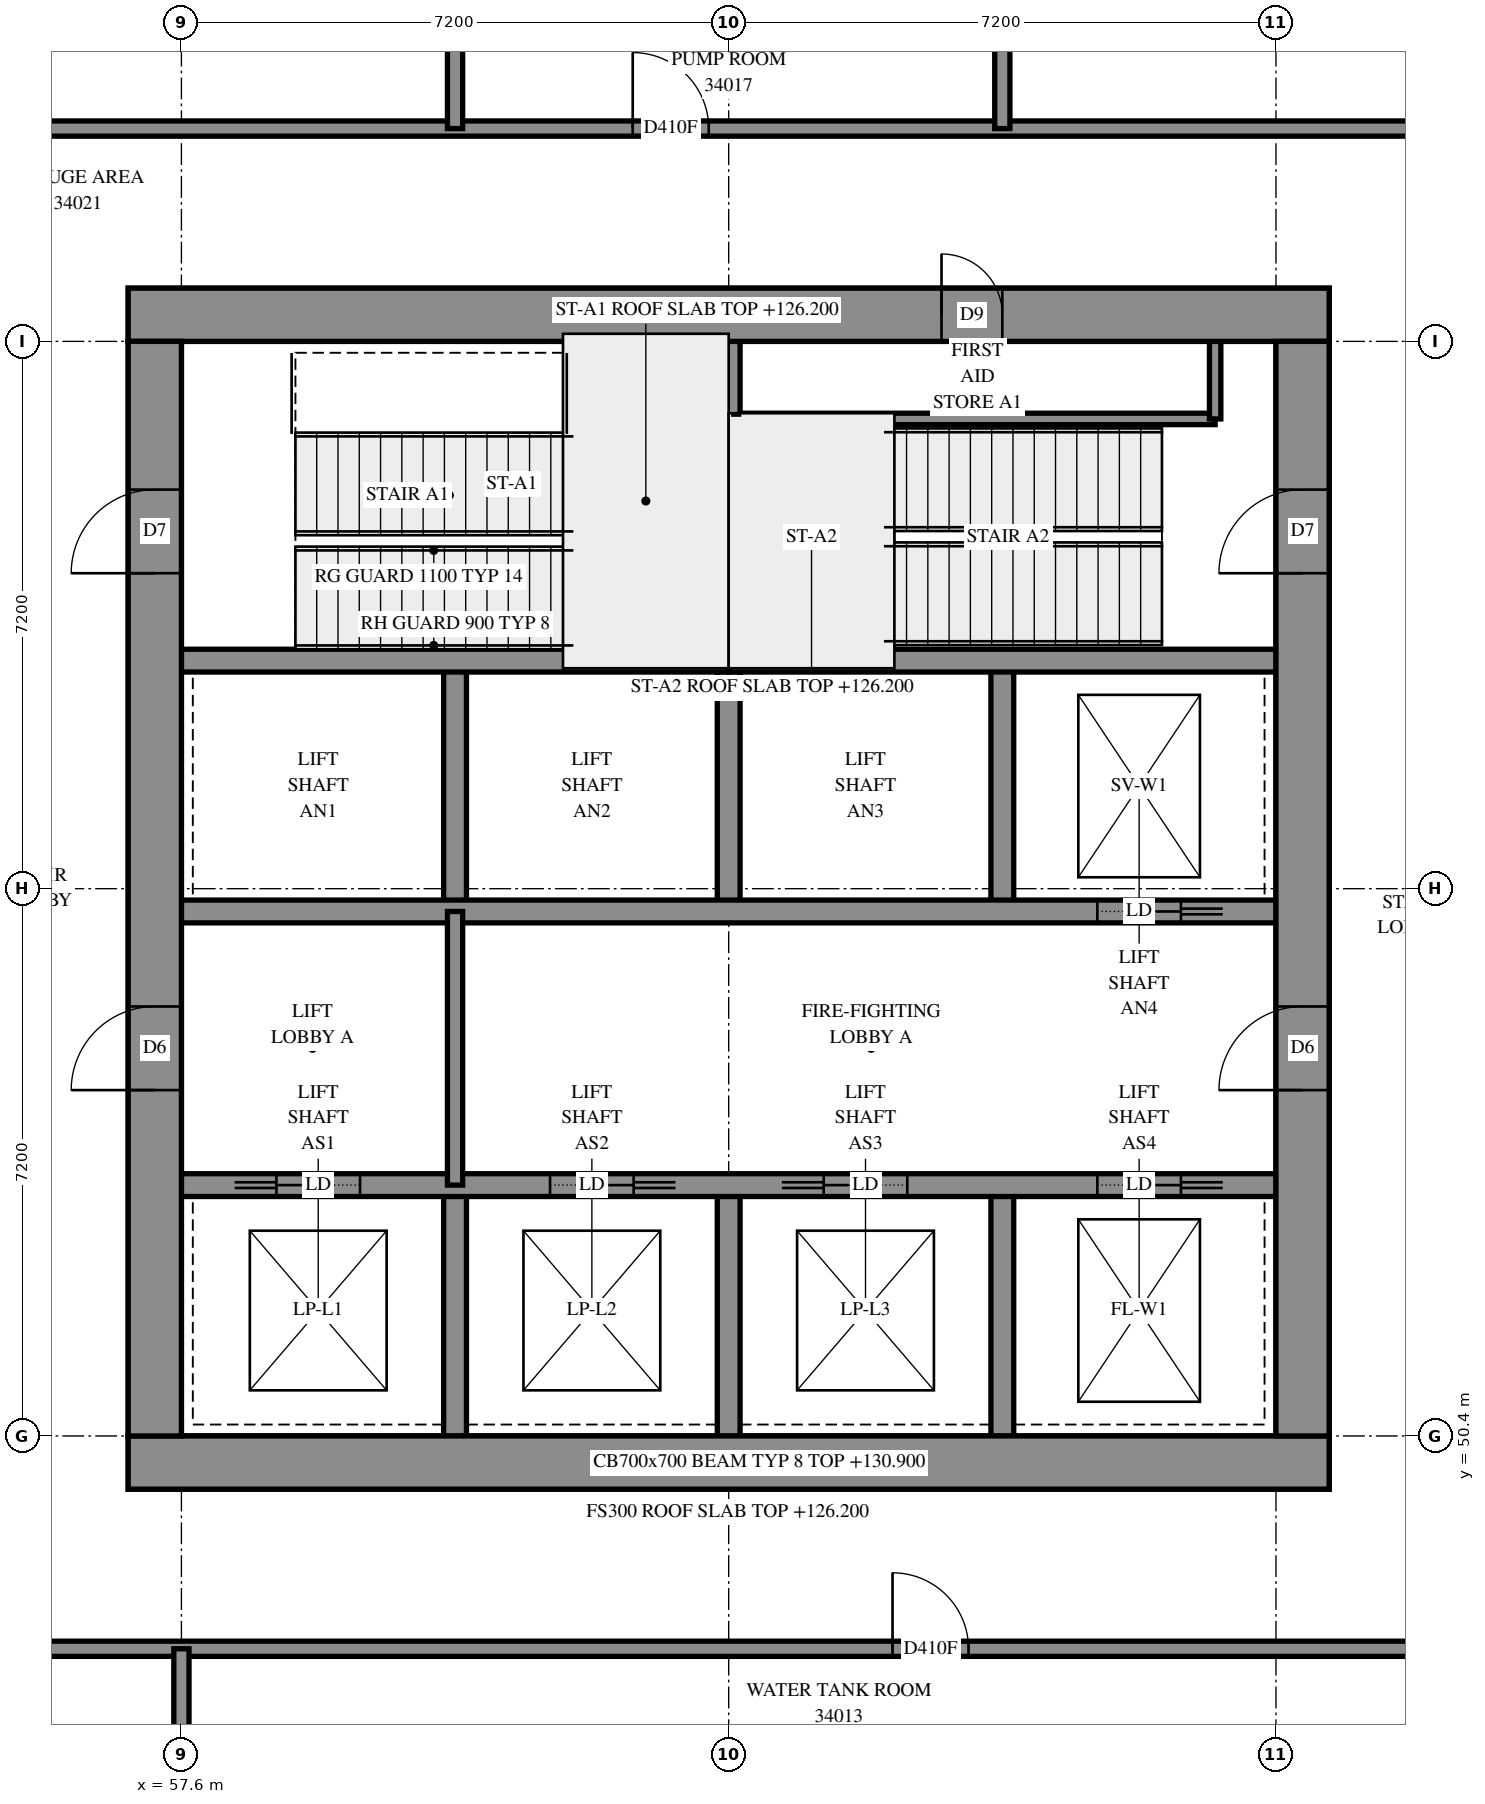
"""IFC4 building model, lengths in metres.
Left out: names, types, materials, properties, quantities, classifications, styles, units other than length and angle.
Written with IfcOpenShell. Run it as: python <this file> out.ifc"""

import sys

from ifc_helpers import new_model, si_unit, direction, frame, frame_2d, origin, place, context, subcontext, project, spatial, rectangle, extrude, element, fill, save


model = new_model("IFC4")
c1 = context("Model", 3, precision=1e-05, world=origin(), true_north=direction((0.0, 1.0)))
c2 = subcontext(c1, "Body", "Model", "MODEL_VIEW")
j1 = project(units=[si_unit("LENGTHUNIT", "METRE"), si_unit("PLANEANGLEUNIT", "RADIAN")], contexts=[c1])
p1 = place(None, origin())
s1 = spatial("IfcSite", under=j1, at=p1, CompositionType="ELEMENT")
p2 = place(p1, origin())
s2 = spatial("IfcBuilding", under=s1, at=p2, CompositionType="ELEMENT")
p3 = place(p2, frame((0.0, 0.0, 126.2)))
s3 = spatial("IfcBuildingStorey", under=s2, at=p3, CompositionType="ELEMENT", Elevation=126.2)
p4 = place(p3, frame((56.9, 50.05, -0.3), z_axis=(0.0, 0.0, 1.0), x_axis=(1.0, 0.0, 0.0)))
e1 = element("IfcWall", 1, at=p4, inside=s3, PredefinedType="SHEAR", context=c2, shape_type="SweptSolid", body=[
    extrude(rectangle(XDim=15.8, YDim=0.7, at=frame_2d((7.9, 0.0))), origin(), (0.0, 0.0, 1.0), 4.3),
])
p5 = place(p3, frame((56.9, 65.15, -0.3), z_axis=(0.0, 0.0, 1.0), x_axis=(1.0, 0.0, 0.0)))
e2 = element("IfcWall", 2, at=p5, inside=s3, PredefinedType="SHEAR", context=c2, shape_type="SweptSolid", body=[
    extrude(rectangle(XDim=15.8, YDim=0.7, at=frame_2d((7.9, 0.0))), origin(), (0.0, 0.0, 1.0), 4.3),
])
p6 = place(p5, frame((10.7, 0.0, 0.3)))
e3 = element("IfcOpeningElement", 3, at=p6, cuts=e2, PredefinedType="OPENING", context=c2, shape_type="SweptSolid", body=[
    extrude(rectangle(XDim=0.8, YDim=2.1, at=frame_2d((0.4, 1.05))), frame((0.0, 0.36, 0.0), z_axis=(0.0, -1.0, 0.0), x_axis=(1.0, 0.0, 0.0)), (0.0, 0.0, 1.0), 0.72),
])
p7 = place(p3, frame((57.25, 50.4, -0.3), z_axis=(0.0, 0.0, 1.0), x_axis=(0.0, 1.0, 0.0)))
e4 = element("IfcWall", 4, at=p7, inside=s3, PredefinedType="SHEAR", context=c2, shape_type="SweptSolid", body=[
    extrude(rectangle(XDim=14.4, YDim=0.7, at=frame_2d((7.2, 0.0))), origin(), (0.0, 0.0, 1.0), 4.3),
])
p8 = place(p7, frame((4.55, 0.0, 0.3)))
e5 = element("IfcOpeningElement", 5, at=p8, cuts=e4, PredefinedType="OPENING", context=c2, shape_type="SweptSolid", body=[
    extrude(rectangle(XDim=1.1, YDim=2.1, at=frame_2d((0.55, 1.05))), frame((0.0, 0.36, 0.0), z_axis=(0.0, -1.0, 0.0), x_axis=(1.0, 0.0, 0.0)), (0.0, 0.0, 1.0), 0.72),
])
p9 = place(p7, frame((11.35, 0.0, 0.3)))
e6 = element("IfcOpeningElement", 6, at=p9, cuts=e4, PredefinedType="OPENING", context=c2, shape_type="SweptSolid", body=[
    extrude(rectangle(XDim=1.1, YDim=2.1, at=frame_2d((0.55, 1.05))), frame((0.0, 0.36, 0.0), z_axis=(0.0, -1.0, 0.0), x_axis=(1.0, 0.0, 0.0)), (0.0, 0.0, 1.0), 0.72),
])
p10 = place(p3, frame((72.35, 50.4, -0.3), z_axis=(0.0, 0.0, 1.0), x_axis=(0.0, 1.0, 0.0)))
e7 = element("IfcWall", 7, at=p10, inside=s3, PredefinedType="SHEAR", context=c2, shape_type="SweptSolid", body=[
    extrude(rectangle(XDim=14.4, YDim=0.7, at=frame_2d((7.2, 0.0))), origin(), (0.0, 0.0, 1.0), 4.3),
])
p11 = place(p10, frame((4.55, 0.0, 0.3)))
e8 = element("IfcOpeningElement", 8, at=p11, cuts=e7, PredefinedType="OPENING", context=c2, shape_type="SweptSolid", body=[
    extrude(rectangle(XDim=1.1, YDim=2.1, at=frame_2d((0.55, 1.05))), frame((0.0, 0.36, 0.0), z_axis=(0.0, -1.0, 0.0), x_axis=(1.0, 0.0, 0.0)), (0.0, 0.0, 1.0), 0.72),
])
p12 = place(p10, frame((11.35, 0.0, 0.3)))
e9 = element("IfcOpeningElement", 9, at=p12, cuts=e7, PredefinedType="OPENING", context=c2, shape_type="SweptSolid", body=[
    extrude(rectangle(XDim=1.1, YDim=2.1, at=frame_2d((0.55, 1.05))), frame((0.0, 0.36, 0.0), z_axis=(0.0, -1.0, 0.0), x_axis=(1.0, 0.0, 0.0)), (0.0, 0.0, 1.0), 0.72),
])
for number, where, z_axis, x_axis in (
    (10, (61.2, 50.4, 0.0), (0.0, 0.0, 1.0), (0.0, 1.0, 0.0)),
    (11, (61.2, 57.3, 0.0), (0.0, 0.0, 1.0), (0.0, 1.0, 0.0)),
    (12, (64.8, 50.4, 0.0), (0.0, 0.0, 1.0), (0.0, 1.0, 0.0)),
    (13, (64.8, 57.3, 0.0), (0.0, 0.0, 1.0), (0.0, 1.0, 0.0)),
    (14, (68.4, 50.4, 0.0), (0.0, 0.0, 1.0), (0.0, 1.0, 0.0)),
    (15, (68.4, 57.3, 0.0), (0.0, 0.0, 1.0), (0.0, 1.0, 0.0)),
):
    element("IfcWall", number, at=place(p3, frame(where, z_axis=z_axis, x_axis=x_axis)), inside=s3, PredefinedType="SOLIDWALL", context=c2, shape_type="SweptSolid", body=[
        extrude(rectangle(XDim=3.3, YDim=0.3, at=frame_2d((1.65, 0.0))), origin(), (0.0, 0.0, 1.0), 4.7),
    ])
p13 = place(p3, frame((57.6, 53.7, 0.0), z_axis=(0.0, 0.0, 1.0), x_axis=(1.0, 0.0, 0.0)))
e16 = element("IfcWall", 16, at=p13, inside=s3, PredefinedType="SOLIDWALL", context=c2, shape_type="SweptSolid", body=[
    extrude(rectangle(XDim=14.4, YDim=0.3, at=frame_2d((7.2, 0.0))), origin(), (0.0, 0.0, 1.0), 4.7),
])
p14 = place(p13, frame((1.25, 0.0, 0.0)))
e17 = element("IfcOpeningElement", 17, at=p14, cuts=e16, PredefinedType="OPENING", context=c2, shape_type="SweptSolid", body=[
    extrude(rectangle(XDim=1.1, YDim=2.1, at=frame_2d((0.55, 1.05))), frame((0.0, 0.16, 0.0), z_axis=(0.0, -1.0, 0.0), x_axis=(1.0, 0.0, 0.0)), (0.0, 0.0, 1.0), 0.32),
])
p15 = place(p13, frame((4.85, 0.0, 0.0)))
e18 = element("IfcOpeningElement", 18, at=p15, cuts=e16, PredefinedType="OPENING", context=c2, shape_type="SweptSolid", body=[
    extrude(rectangle(XDim=1.1, YDim=2.1, at=frame_2d((0.55, 1.05))), frame((0.0, 0.16, 0.0), z_axis=(0.0, -1.0, 0.0), x_axis=(1.0, 0.0, 0.0)), (0.0, 0.0, 1.0), 0.32),
])
p16 = place(p13, frame((8.45, 0.0, 0.0)))
e19 = element("IfcOpeningElement", 19, at=p16, cuts=e16, PredefinedType="OPENING", context=c2, shape_type="SweptSolid", body=[
    extrude(rectangle(XDim=1.1, YDim=2.1, at=frame_2d((0.55, 1.05))), frame((0.0, 0.16, 0.0), z_axis=(0.0, -1.0, 0.0), x_axis=(1.0, 0.0, 0.0)), (0.0, 0.0, 1.0), 0.32),
])
p17 = place(p13, frame((12.05, 0.0, 0.0)))
e20 = element("IfcOpeningElement", 20, at=p17, cuts=e16, PredefinedType="OPENING", context=c2, shape_type="SweptSolid", body=[
    extrude(rectangle(XDim=1.1, YDim=2.1, at=frame_2d((0.55, 1.05))), frame((0.0, 0.16, 0.0), z_axis=(0.0, -1.0, 0.0), x_axis=(1.0, 0.0, 0.0)), (0.0, 0.0, 1.0), 0.32),
])
p18 = place(p3, frame((57.6, 57.3, 0.0), z_axis=(0.0, 0.0, 1.0), x_axis=(1.0, 0.0, 0.0)))
e21 = element("IfcWall", 21, at=p18, inside=s3, PredefinedType="SOLIDWALL", context=c2, shape_type="SweptSolid", body=[
    extrude(rectangle(XDim=14.4, YDim=0.3, at=frame_2d((7.2, 0.0))), origin(), (0.0, 0.0, 1.0), 4.7),
])
p19 = place(p18, frame((12.05, 0.0, 0.0)))
e22 = element("IfcOpeningElement", 22, at=p19, cuts=e21, PredefinedType="OPENING", context=c2, shape_type="SweptSolid", body=[
    extrude(rectangle(XDim=1.1, YDim=2.1, at=frame_2d((0.55, 1.05))), frame((0.0, 0.16, 0.0), z_axis=(0.0, -1.0, 0.0), x_axis=(1.0, 0.0, 0.0)), (0.0, 0.0, 1.0), 0.32),
])
for number, where, z_axis, x_axis in (
    (23, (57.6, 60.6, 0.0), (0.0, 0.0, 1.0), (1.0, 0.0, 0.0)),
    (24, (64.8, 60.6, 0.0), (0.0, 0.0, 1.0), (1.0, 0.0, 0.0)),
):
    element("IfcWall", number, at=place(p3, frame(where, z_axis=z_axis, x_axis=x_axis)), inside=s3, PredefinedType="SOLIDWALL", context=c2, shape_type="SweptSolid", body=[
        extrude(rectangle(XDim=7.2, YDim=0.3, at=frame_2d((3.6, 0.0))), origin(), (0.0, 0.0, 1.0), 4.7),
    ])
p20 = place(p3, frame((64.8, 60.6, 0.0), z_axis=(0.0, 0.0, 1.0), x_axis=(0.0, 1.0, 0.0)))
e25 = element("IfcWall", 25, at=p20, inside=s3, PredefinedType="SOLIDWALL", context=c2, shape_type="SweptSolid", body=[
    extrude(rectangle(XDim=4.2, YDim=0.3, at=frame_2d((2.1, 0.0))), origin(), (0.0, 0.0, 1.0), 4.7),
])
p21 = place(p3, frame((64.95, 63.78, 0.0), z_axis=(0.0, 0.0, 1.0), x_axis=(1.0, 0.0, 0.0)))
e26 = element("IfcWall", 26, at=p21, inside=s3, PredefinedType="PARTITIONING", context=c2, shape_type="SweptSolid", body=[
    extrude(rectangle(XDim=6.25, YDim=0.15, at=frame_2d((3.125, 0.0))), origin(), (0.0, 0.0, 1.0), 4.7),
])
p22 = place(p3, frame((71.2, 63.78, 0.0), z_axis=(0.0, 0.0, 1.0), x_axis=(0.0, 1.0, 0.0)))
e27 = element("IfcWall", 27, at=p22, inside=s3, PredefinedType="PARTITIONING", context=c2, shape_type="SweptSolid", body=[
    extrude(rectangle(XDim=1.02, YDim=0.15, at=frame_2d((0.51, 0.0))), origin(), (0.0, 0.0, 1.0), 4.7),
])
p23 = place(p3, frame((61.2, 53.7, 0.0), z_axis=(0.0, 0.0, 1.0), x_axis=(0.0, 1.0, 0.0)))
e28 = element("IfcWall", 28, at=p23, inside=s3, PredefinedType="PARTITIONING", context=c2, shape_type="SweptSolid", body=[
    extrude(rectangle(XDim=3.6, YDim=0.2, at=frame_2d((1.8, 0.0))), origin(), (0.0, 0.0, 1.0), 4.7),
])
p24 = place(p3, frame((54.8, 67.6, 0.0), z_axis=(0.0, 0.0, 1.0), x_axis=(1.0, 0.0, 0.0)))
e29 = element("IfcWall", 29, at=p24, inside=s3, PredefinedType="PARTITIONING", context=c2, shape_type="SweptSolid", body=[
    extrude(rectangle(XDim=19.998, YDim=0.2, at=frame_2d((9.999, 0.0))), origin(), (0.0, 0.0, 1.0), 4.7),
])
p25 = place(p24, frame((8.738, 0.0, 0.0)))
e30 = element("IfcOpeningElement", 30, at=p25, cuts=e29, PredefinedType="OPENING", context=c2, shape_type="SweptSolid", body=[
    extrude(rectangle(XDim=1.0, YDim=2.1, at=frame_2d((0.5, 1.05))), frame((0.0, 0.11, 0.0), z_axis=(0.0, -1.0, 0.0), x_axis=(1.0, 0.0, 0.0)), (0.0, 0.0, 1.0), 0.22),
])
p26 = place(p3, frame((54.8, 47.6, 0.0), z_axis=(0.0, 0.0, 1.0), x_axis=(1.0, 0.0, 0.0)))
e31 = element("IfcWall", 31, at=p26, inside=s3, PredefinedType="PARTITIONING", context=c2, shape_type="SweptSolid", body=[
    extrude(rectangle(XDim=19.384, YDim=0.2, at=frame_2d((9.692, 0.0))), origin(), (0.0, 0.0, 1.0), 4.7),
])
p27 = place(p26, frame((12.156, 0.0, 0.0)))
e32 = element("IfcOpeningElement", 32, at=p27, cuts=e31, PredefinedType="OPENING", context=c2, shape_type="SweptSolid", body=[
    extrude(rectangle(XDim=1.0, YDim=2.1, at=frame_2d((0.5, 1.05))), frame((0.0, 0.11, 0.0), z_axis=(0.0, -1.0, 0.0), x_axis=(1.0, 0.0, 0.0)), (0.0, 0.0, 1.0), 0.22),
])
for number, where, z_axis, x_axis in (
    (33, (57.6, 46.15, 0.0), (0.0, 0.0, 1.0), (0.0, 1.0, 0.0)),
    (34, (61.2, 67.6, 0.0), (0.0, 0.0, 1.0), (0.0, 1.0, 0.0)),
    (35, (68.4, 67.6, 0.0), (0.0, 0.0, 1.0), (0.0, 1.0, 0.0)),
):
    element("IfcWall", number, at=place(p3, frame(where, z_axis=z_axis, x_axis=x_axis)), inside=s3, PredefinedType="PARTITIONING", context=c2, shape_type="SweptSolid", body=[
        extrude(rectangle(XDim=1.45, YDim=0.2, at=frame_2d((0.725, 0.0))), origin(), (0.0, 0.0, 1.0), 4.7),
    ])
p28 = place(p6, origin())
e36 = element("IfcDoor", 36, at=p28, inside=s3, OperationType="SINGLE_SWING_RIGHT", PredefinedType="DOOR", context=c2, shape_type="SweptSolid", body=[
    extrude(rectangle(XDim=0.8, YDim=2.1, at=frame_2d((0.4, 1.05))), frame((0.0, -0.29, 0.0), z_axis=(0.0, -1.0, 0.0), x_axis=(1.0, 0.0, 0.0)), (0.0, 0.0, 1.0), 0.05),
])
fill(e3, e36)
p29 = place(p8, origin())
e37 = element("IfcDoor", 37, at=p29, inside=s3, OperationType="DOUBLE_DOOR_SINGLE_SWING", PredefinedType="DOOR", context=c2, shape_type="SweptSolid", body=[
    extrude(rectangle(XDim=1.1, YDim=2.1, at=frame_2d((0.55, 1.05))), frame((0.0, 0.025, 0.0), z_axis=(0.0, -1.0, 0.0), x_axis=(1.0, 0.0, 0.0)), (0.0, 0.0, 1.0), 0.05),
])
fill(e5, e37)
p30 = place(p11, origin())
e38 = element("IfcDoor", 38, at=p30, inside=s3, OperationType="DOUBLE_DOOR_SINGLE_SWING", PredefinedType="DOOR", context=c2, shape_type="SweptSolid", body=[
    extrude(rectangle(XDim=1.1, YDim=2.1, at=frame_2d((0.55, 1.05))), frame((0.0, 0.025, 0.0), z_axis=(0.0, -1.0, 0.0), x_axis=(1.0, 0.0, 0.0)), (0.0, 0.0, 1.0), 0.05),
])
fill(e8, e38)
p31 = place(p9, origin())
e39 = element("IfcDoor", 39, at=p31, inside=s3, OperationType="SINGLE_SWING_LEFT", PredefinedType="DOOR", context=c2, shape_type="SweptSolid", body=[
    extrude(rectangle(XDim=1.1, YDim=2.1, at=frame_2d((0.55, 1.05))), frame((0.0, 0.025, 0.0), z_axis=(0.0, -1.0, 0.0), x_axis=(1.0, 0.0, 0.0)), (0.0, 0.0, 1.0), 0.05),
])
fill(e6, e39)
p32 = place(p12, origin())
e40 = element("IfcDoor", 40, at=p32, inside=s3, OperationType="SINGLE_SWING_RIGHT", PredefinedType="DOOR", context=c2, shape_type="SweptSolid", body=[
    extrude(rectangle(XDim=1.1, YDim=2.1, at=frame_2d((0.55, 1.05))), frame((0.0, 0.025, 0.0), z_axis=(0.0, -1.0, 0.0), x_axis=(1.0, 0.0, 0.0)), (0.0, 0.0, 1.0), 0.05),
])
fill(e9, e40)
p33 = place(p14, origin())
e41 = element("IfcDoor", 41, at=p33, inside=s3, OperationType="SLIDING_TO_LEFT", PredefinedType="DOOR", context=c2, shape_type="SweptSolid", body=[
    extrude(rectangle(XDim=1.1, YDim=2.1, at=frame_2d((0.55, 1.05))), frame((0.0, 0.025, 0.0), z_axis=(0.0, -1.0, 0.0), x_axis=(1.0, 0.0, 0.0)), (0.0, 0.0, 1.0), 0.05),
])
fill(e17, e41)
p34 = place(p15, origin())
e42 = element("IfcDoor", 42, at=p34, inside=s3, OperationType="SLIDING_TO_RIGHT", PredefinedType="DOOR", context=c2, shape_type="SweptSolid", body=[
    extrude(rectangle(XDim=1.1, YDim=2.1, at=frame_2d((0.55, 1.05))), frame((0.0, 0.025, 0.0), z_axis=(0.0, -1.0, 0.0), x_axis=(1.0, 0.0, 0.0)), (0.0, 0.0, 1.0), 0.05),
])
fill(e18, e42)
p35 = place(p16, origin())
e43 = element("IfcDoor", 43, at=p35, inside=s3, OperationType="SLIDING_TO_LEFT", PredefinedType="DOOR", context=c2, shape_type="SweptSolid", body=[
    extrude(rectangle(XDim=1.1, YDim=2.1, at=frame_2d((0.55, 1.05))), frame((0.0, 0.025, 0.0), z_axis=(0.0, -1.0, 0.0), x_axis=(1.0, 0.0, 0.0)), (0.0, 0.0, 1.0), 0.05),
])
fill(e19, e43)
p36 = place(p17, origin())
e44 = element("IfcDoor", 44, at=p36, inside=s3, OperationType="SLIDING_TO_RIGHT", PredefinedType="DOOR", context=c2, shape_type="SweptSolid", body=[
    extrude(rectangle(XDim=1.1, YDim=2.1, at=frame_2d((0.55, 1.05))), frame((0.0, 0.025, 0.0), z_axis=(0.0, -1.0, 0.0), x_axis=(1.0, 0.0, 0.0)), (0.0, 0.0, 1.0), 0.05),
])
fill(e20, e44)
p37 = place(p19, origin())
e45 = element("IfcDoor", 45, at=p37, inside=s3, OperationType="SLIDING_TO_RIGHT", PredefinedType="DOOR", context=c2, shape_type="SweptSolid", body=[
    extrude(rectangle(XDim=1.1, YDim=2.1, at=frame_2d((0.55, 1.05))), frame((0.0, 0.025, 0.0), z_axis=(0.0, -1.0, 0.0), x_axis=(1.0, 0.0, 0.0)), (0.0, 0.0, 1.0), 0.05),
])
fill(e22, e45)
p38 = place(p27, origin())
e46 = element("IfcDoor", 46, at=p38, inside=s3, OperationType="SINGLE_SWING_LEFT", PredefinedType="DOOR", context=c2, shape_type="SweptSolid", body=[
    extrude(rectangle(XDim=1.0, YDim=2.1, at=frame_2d((0.5, 1.05))), frame((0.0, 0.025, 0.0), z_axis=(0.0, -1.0, 0.0), x_axis=(1.0, 0.0, 0.0)), (0.0, 0.0, 1.0), 0.05),
])
fill(e32, e46)
p39 = place(p25, origin())
e47 = element("IfcDoor", 47, at=p39, inside=s3, OperationType="SINGLE_SWING_LEFT", PredefinedType="DOOR", context=c2, shape_type="SweptSolid", body=[
    extrude(rectangle(XDim=1.0, YDim=2.1, at=frame_2d((0.5, 1.05))), frame((0.0, 0.025, 0.0), z_axis=(0.0, -1.0, 0.0), x_axis=(1.0, 0.0, 0.0)), (0.0, 0.0, 1.0), 0.05),
])
fill(e30, e47)
save(model, sys.argv[1])
